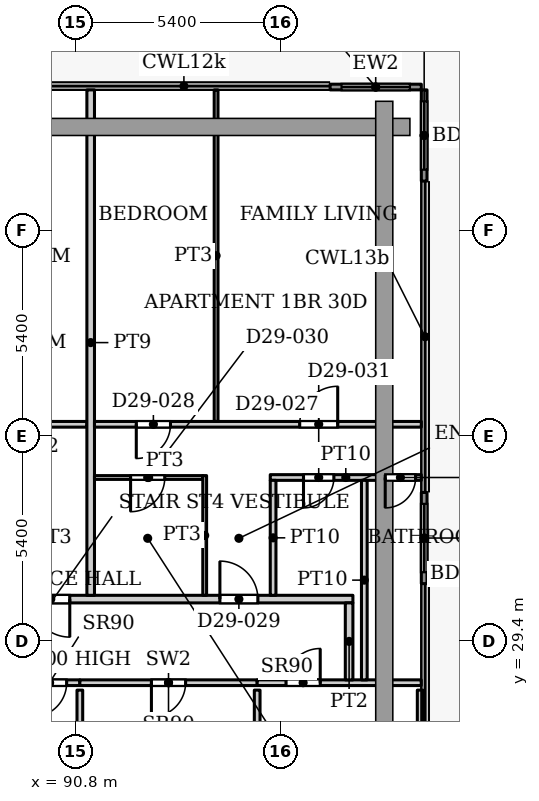
"""IFC4 building model, lengths in metres.
Left out: names, types, materials, properties, quantities, classifications, styles, units other than length and angle.
Written with IfcOpenShell. Run it as: python <this file> out.ifc"""

import sys

from ifc_helpers import new_model, si_unit, direction, frame, frame_2d, origin, place, context, subcontext, project, spatial, rectangle, extrude, source, transform, mapped, element, fill, save


model = new_model("IFC4")
c1 = context("Model", 3, precision=1e-05, world=origin(), true_north=direction((0.0, 1.0)))
c2 = subcontext(c1, "Body", "Model", "MODEL_VIEW")
j1 = project(units=[si_unit("LENGTHUNIT", "METRE"), si_unit("PLANEANGLEUNIT", "RADIAN")], contexts=[c1])
p1 = place(None, origin())
s1 = spatial("IfcSite", under=j1, at=p1, CompositionType="ELEMENT")
p2 = place(p1, origin())
s2 = spatial("IfcBuilding", under=s1, at=p2, CompositionType="ELEMENT")
p3 = place(p2, frame((0.0, 0.0, 129.2)))
s3 = spatial("IfcBuildingStorey", under=s2, at=p3, CompositionType="ELEMENT", Elevation=129.2)
p4 = place(p3, frame((97.5, 43.975, 0.0), z_axis=(0.0, 0.0, 1.0), x_axis=(1.0, 0.0, 0.0)))
e1 = element("IfcWall", 1, at=p4, inside=s3, PredefinedType="SOLIDWALL", context=c2, shape_type="SweptSolid", body=[
    extrude(rectangle(XDim=2.4, YDim=0.15, at=frame_2d((1.2, 0.0))), origin(), (0.0, 0.0, 1.0), 3.75),
])
p5 = place(p4, frame((0.3, 0.0, 0.0)))
e2 = element("IfcOpeningElement", 2, at=p5, cuts=e1, PredefinedType="OPENING", context=c2, shape_type="SweptSolid", body=[
    extrude(rectangle(XDim=1.8, YDim=2.4, at=frame_2d((0.9, 1.2))), frame((0.0, 0.085, 0.0), z_axis=(0.0, -1.0, 0.0), x_axis=(1.0, 0.0, 0.0)), (0.0, 0.0, 1.0), 0.17),
])
p6 = place(p3, frame((99.975, 43.9, 0.0), z_axis=(0.0, 0.0, 1.0), x_axis=(0.0, -1.0, 0.0)))
e3 = element("IfcWall", 3, at=p6, inside=s3, PredefinedType="SOLIDWALL", context=c2, shape_type="SweptSolid", body=[
    extrude(rectangle(XDim=2.4, YDim=0.15, at=frame_2d((1.2, 0.0))), origin(), (0.0, 0.0, 1.0), 3.75),
])
p7 = place(p6, frame((0.3, 0.0, 0.0)))
e4 = element("IfcOpeningElement", 4, at=p7, cuts=e3, PredefinedType="OPENING", context=c2, shape_type="SweptSolid", body=[
    extrude(rectangle(XDim=1.8, YDim=2.4, at=frame_2d((0.9, 1.2))), frame((0.0, 0.085, 0.0), z_axis=(0.0, -1.0, 0.0), x_axis=(1.0, 0.0, 0.0)), (0.0, 0.0, 1.0), 0.17),
])
p8 = place(p3, frame((99.975, 33.307, 0.0), z_axis=(0.0, 0.0, 1.0), x_axis=(0.0, -1.0, 0.0)))
e5 = element("IfcWall", 5, at=p8, inside=s3, PredefinedType="SOLIDWALL", context=c2, shape_type="SweptSolid", body=[
    extrude(rectangle(XDim=2.4, YDim=0.15, at=frame_2d((1.2, 0.0))), origin(), (0.0, 0.0, 1.0), 3.75),
])
p9 = place(p8, frame((0.3, 0.0, 0.0)))
e6 = element("IfcOpeningElement", 6, at=p9, cuts=e5, PredefinedType="OPENING", context=c2, shape_type="SweptSolid", body=[
    extrude(rectangle(XDim=1.8, YDim=2.4, at=frame_2d((0.9, 1.2))), frame((0.0, 0.085, 0.0), z_axis=(0.0, -1.0, 0.0), x_axis=(1.0, 0.0, 0.0)), (0.0, 0.0, 1.0), 0.17),
])
p10 = place(p3, frame((89.32, 28.3, 0.0), z_axis=(0.0, 0.0, 1.0), x_axis=(1.0, 0.0, 0.0)))
e7 = element("IfcWall", 7, at=p10, inside=s3, PredefinedType="PARTITIONING", context=c2, shape_type="SweptSolid", body=[
    extrude(rectangle(XDim=1.595, YDim=0.15, at=frame_2d((0.797, 0.0))), origin(), (0.0, 0.0, 1.0), 2.5),
])
p11 = place(p10, frame((0.348, 0.0, 0.0)))
e8 = element("IfcOpeningElement", 8, at=p11, cuts=e7, PredefinedType="OPENING", context=c2, shape_type="SweptSolid", body=[
    extrude(rectangle(XDim=0.9, YDim=2.2, at=frame_2d((0.45, 1.1))), frame((0.0, 0.085, 0.0), z_axis=(0.0, -1.0, 0.0), x_axis=(1.0, 0.0, 0.0)), (0.0, 0.0, 1.0), 0.17),
])
p12 = place(p3, frame((90.915, 21.487, 0.0), z_axis=(0.0, 0.0, 1.0), x_axis=(0.0, 1.0, 0.0)))
e9 = element("IfcWall", 9, at=p12, inside=s3, PredefinedType="PARTITIONING", context=c2, shape_type="SweptSolid", body=[
    extrude(rectangle(XDim=6.618, YDim=0.15, at=frame_2d((3.309, 0.0))), origin(), (0.0, 0.0, 1.0), 2.5),
])
p13 = place(p3, frame((90.915, 28.3, 0.0), z_axis=(0.0, 0.0, 1.0), x_axis=(1.0, 0.0, 0.0)))
e10 = element("IfcWall", 10, at=p13, inside=s3, PredefinedType="PARTITIONING", context=c2, shape_type="SweptSolid", body=[
    extrude(rectangle(XDim=4.666, YDim=0.15, at=frame_2d((2.333, 0.0))), origin(), (0.0, 0.0, 1.0), 3.9),
])
p14 = place(p13, frame((1.883, 0.0, 0.0)))
e11 = element("IfcOpeningElement", 11, at=p14, cuts=e10, PredefinedType="OPENING", context=c2, shape_type="SweptSolid", body=[
    extrude(rectangle(XDim=0.9, YDim=2.2, at=frame_2d((0.45, 1.1))), frame((0.0, 0.085, 0.0), z_axis=(0.0, -1.0, 0.0), x_axis=(1.0, 0.0, 0.0)), (0.0, 0.0, 1.0), 0.17),
])
p15 = place(p3, frame((95.581, 21.241, 0.0), z_axis=(0.0, 0.0, 1.0), x_axis=(0.0, 1.0, 0.0)))
e12 = element("IfcWall", 12, at=p15, inside=s3, PredefinedType="PARTITIONING", context=c2, shape_type="SweptSolid", body=[
    extrude(rectangle(XDim=6.864, YDim=0.15, at=frame_2d((3.432, 0.0))), origin(), (0.0, 0.0, 1.0), 3.9),
])
p16 = place(p3, frame((95.581, 28.3, 0.0), z_axis=(0.0, 0.0, 1.0), x_axis=(1.0, 0.0, 0.0)))
e13 = element("IfcWall", 13, at=p16, inside=s3, PredefinedType="PARTITIONING", context=c2, shape_type="SweptSolid", body=[
    extrude(rectangle(XDim=4.317, YDim=0.15, at=frame_2d((2.158, 0.0))), origin(), (0.0, 0.0, 1.0), 3.9),
])
p17 = place(p16, frame((0.759, 0.0, 0.0)))
e14 = element("IfcOpeningElement", 14, at=p17, cuts=e13, PredefinedType="OPENING", context=c2, shape_type="SweptSolid", body=[
    extrude(rectangle(XDim=0.9, YDim=2.2, at=frame_2d((0.45, 1.1))), frame((0.0, 0.085, 0.0), z_axis=(0.0, -1.0, 0.0), x_axis=(1.0, 0.0, 0.0)), (0.0, 0.0, 1.0), 0.17),
])
p18 = place(p3, frame((99.87, 21.015, 0.0), z_axis=(0.0, 0.0, 1.0), x_axis=(0.0, 1.0, 0.0)))
e15 = element("IfcWall", 15, at=p18, inside=s3, PredefinedType="PARTITIONING", context=c2, shape_type="SweptSolid", body=[
    extrude(rectangle(XDim=7.09, YDim=0.15, at=frame_2d((3.545, 0.0))), origin(), (0.0, 0.0, 1.0), 3.9),
])
p19 = place(p3, frame((55.9, 30.5, 0.0), z_axis=(0.0, 0.0, 1.0), x_axis=(1.0, 0.0, 0.0)))
e16 = element("IfcWall", 16, at=p19, inside=s3, PredefinedType="PARTITIONING", context=c2, shape_type="SweptSolid", body=[
    extrude(rectangle(XDim=42.2, YDim=0.2, at=frame_2d((21.1, 0.0))), origin(), (0.0, 0.0, 1.0), 3.6),
])
p20 = place(p19, frame((0.45, 0.0, 0.0)))
e17 = element("IfcOpeningElement", 17, at=p20, cuts=e16, PredefinedType="OPENING", context=c2, shape_type="SweptSolid", body=[
    extrude(rectangle(XDim=1.0, YDim=2.1, at=frame_2d((0.5, 1.05))), frame((0.0, 0.11, 0.0), z_axis=(0.0, -1.0, 0.0), x_axis=(1.0, 0.0, 0.0)), (0.0, 0.0, 1.0), 0.22),
])
p21 = place(p19, frame((20.1, 0.0, 0.0)))
e18 = element("IfcOpeningElement", 18, at=p21, cuts=e16, PredefinedType="OPENING", context=c2, shape_type="SweptSolid", body=[
    extrude(rectangle(XDim=1.0, YDim=2.1, at=frame_2d((0.5, 1.05))), frame((0.0, 0.11, 0.0), z_axis=(0.0, -1.0, 0.0), x_axis=(1.0, 0.0, 0.0)), (0.0, 0.0, 1.0), 0.22),
])
p22 = place(p19, frame((33.75, 0.0, 0.0)))
e19 = element("IfcOpeningElement", 19, at=p22, cuts=e16, PredefinedType="OPENING", context=c2, shape_type="SweptSolid", body=[
    extrude(rectangle(XDim=1.0, YDim=2.1, at=frame_2d((0.5, 1.05))), frame((0.0, 0.11, 0.0), z_axis=(0.0, -1.0, 0.0), x_axis=(1.0, 0.0, 0.0)), (0.0, 0.0, 1.0), 0.22),
])
p23 = place(p19, frame((38.7, 0.0, 0.0)))
e20 = element("IfcOpeningElement", 20, at=p23, cuts=e16, PredefinedType="OPENING", context=c2, shape_type="SweptSolid", body=[
    extrude(rectangle(XDim=1.0, YDim=2.1, at=frame_2d((0.5, 1.05))), frame((0.0, 0.11, 0.0), z_axis=(0.0, -1.0, 0.0), x_axis=(1.0, 0.0, 0.0)), (0.0, 0.0, 1.0), 0.22),
])
p24 = place(p3, frame((81.7, 35.1, 0.0), z_axis=(0.0, 0.0, 1.0), x_axis=(1.0, 0.0, 0.0)))
e21 = element("IfcWall", 21, at=p24, inside=s3, PredefinedType="PARTITIONING", context=c2, shape_type="SweptSolid", body=[
    extrude(rectangle(XDim=9.4, YDim=0.15, at=frame_2d((4.7, 0.0))), origin(), (0.0, 0.0, 1.0), 3.6),
])
p25 = place(p24, frame((7.1, 0.0, 0.0)))
e22 = element("IfcOpeningElement", 22, at=p25, cuts=e21, PredefinedType="OPENING", context=c2, shape_type="SweptSolid", body=[
    extrude(rectangle(XDim=0.9, YDim=2.1, at=frame_2d((0.45, 1.05))), frame((0.0, 0.085, 0.0), z_axis=(0.0, -1.0, 0.0), x_axis=(1.0, 0.0, 0.0)), (0.0, 0.0, 1.0), 0.17),
])
p26 = place(p24, frame((2.25, 0.0, 0.0)))
e23 = element("IfcOpeningElement", 23, at=p26, cuts=e21, PredefinedType="OPENING", context=c2, shape_type="SweptSolid", body=[
    extrude(rectangle(XDim=1.0, YDim=2.1, at=frame_2d((0.5, 1.05))), frame((0.0, 0.085, 0.0), z_axis=(0.0, -1.0, 0.0), x_axis=(1.0, 0.0, 0.0)), (0.0, 0.0, 1.0), 0.17),
])
p27 = place(p3, frame((91.2, 30.6, 0.0), z_axis=(0.0, 0.0, 1.0), x_axis=(0.0, 1.0, 0.0)))
e24 = element("IfcWall", 24, at=p27, inside=s3, PredefinedType="PARTITIONING", context=c2, shape_type="SweptSolid", body=[
    extrude(rectangle(XDim=13.3, YDim=0.2, at=frame_2d((6.65, 0.0))), origin(), (0.0, 0.0, 1.0), 3.6),
])
p28 = place(p3, frame((91.3, 33.7, 0.0), z_axis=(0.0, 0.0, 1.0), x_axis=(1.0, 0.0, 0.0)))
e25 = element("IfcWall", 25, at=p28, inside=s3, PredefinedType="PARTITIONING", context=c2, shape_type="SweptSolid", body=[
    extrude(rectangle(XDim=2.85, YDim=0.1, at=frame_2d((1.425, 0.0))), origin(), (0.0, 0.0, 1.0), 3.6),
])
p29 = place(p28, frame((0.95, 0.0, 0.0)))
e26 = element("IfcOpeningElement", 26, at=p29, cuts=e25, PredefinedType="OPENING", context=c2, shape_type="SweptSolid", body=[
    extrude(rectangle(XDim=0.9, YDim=2.1, at=frame_2d((0.45, 1.05))), frame((0.0, 0.06, 0.0), z_axis=(0.0, -1.0, 0.0), x_axis=(1.0, 0.0, 0.0)), (0.0, 0.0, 1.0), 0.12),
])
p30 = place(p3, frame((91.3, 35.1, 0.0), z_axis=(0.0, 0.0, 1.0), x_axis=(1.0, 0.0, 0.0)))
e27 = element("IfcWall", 27, at=p30, inside=s3, PredefinedType="PARTITIONING", context=c2, shape_type="SweptSolid", body=[
    extrude(rectangle(XDim=8.6, YDim=0.15, at=frame_2d((4.3, 0.0))), origin(), (0.0, 0.0, 1.0), 3.6),
])
p31 = place(p30, frame((1.1, 0.0, 0.0)))
e28 = element("IfcOpeningElement", 28, at=p31, cuts=e27, PredefinedType="OPENING", context=c2, shape_type="SweptSolid", body=[
    extrude(rectangle(XDim=0.9, YDim=2.1, at=frame_2d((0.45, 1.05))), frame((0.0, 0.085, 0.0), z_axis=(0.0, -1.0, 0.0), x_axis=(1.0, 0.0, 0.0)), (0.0, 0.0, 1.0), 0.17),
])
p32 = place(p30, frame((5.4, 0.0, 0.0)))
e29 = element("IfcOpeningElement", 29, at=p32, cuts=e27, PredefinedType="OPENING", context=c2, shape_type="SweptSolid", body=[
    extrude(rectangle(XDim=1.0, YDim=2.1, at=frame_2d((0.5, 1.05))), frame((0.0, 0.085, 0.0), z_axis=(0.0, -1.0, 0.0), x_axis=(1.0, 0.0, 0.0)), (0.0, 0.0, 1.0), 0.17),
])
p33 = place(p3, frame((94.2, 30.6, 0.0), z_axis=(0.0, 0.0, 1.0), x_axis=(0.0, 1.0, 0.0)))
e30 = element("IfcWall", 30, at=p33, inside=s3, PredefinedType="PARTITIONING", context=c2, shape_type="SweptSolid", body=[
    extrude(rectangle(XDim=3.15, YDim=0.1, at=frame_2d((1.575, 0.0))), origin(), (0.0, 0.0, 1.0), 3.6),
])
p34 = place(p3, frame((94.5, 35.175, 0.0), z_axis=(0.0, 0.0, 1.0), x_axis=(0.0, 1.0, 0.0)))
e31 = element("IfcWall", 31, at=p34, inside=s3, PredefinedType="PARTITIONING", context=c2, shape_type="SweptSolid", body=[
    extrude(rectangle(XDim=8.725, YDim=0.1, at=frame_2d((4.362, 0.0))), origin(), (0.0, 0.0, 1.0), 3.6),
])
p35 = place(p3, frame((95.925, 33.7, 0.0), z_axis=(0.0, 0.0, 1.0), x_axis=(1.0, 0.0, 0.0)))
e32 = element("IfcWall", 32, at=p35, inside=s3, PredefinedType="PARTITIONING", context=c2, shape_type="SweptSolid", body=[
    extrude(rectangle(XDim=3.975, YDim=0.15, at=frame_2d((1.987, 0.0))), origin(), (0.0, 0.0, 1.0), 3.6),
])
p36 = place(p35, frame((0.875, 0.0, 0.0)))
e33 = element("IfcOpeningElement", 33, at=p36, cuts=e32, PredefinedType="OPENING", context=c2, shape_type="SweptSolid", body=[
    extrude(rectangle(XDim=0.8, YDim=2.1, at=frame_2d((0.4, 1.05))), frame((0.0, 0.085, 0.0), z_axis=(0.0, -1.0, 0.0), x_axis=(1.0, 0.0, 0.0)), (0.0, 0.0, 1.0), 0.17),
])
p37 = place(p35, frame((3.025, 0.0, 0.0)))
e34 = element("IfcOpeningElement", 34, at=p37, cuts=e32, PredefinedType="OPENING", context=c2, shape_type="SweptSolid", body=[
    extrude(rectangle(XDim=0.8, YDim=2.1, at=frame_2d((0.4, 1.05))), frame((0.0, 0.085, 0.0), z_axis=(0.0, -1.0, 0.0), x_axis=(1.0, 0.0, 0.0)), (0.0, 0.0, 1.0), 0.17),
])
p38 = place(p3, frame((96.0, 30.6, 0.0), z_axis=(0.0, 0.0, 1.0), x_axis=(0.0, 1.0, 0.0)))
e35 = element("IfcWall", 35, at=p38, inside=s3, PredefinedType="PARTITIONING", context=c2, shape_type="SweptSolid", body=[
    extrude(rectangle(XDim=3.025, YDim=0.15, at=frame_2d((1.512, 0.0))), origin(), (0.0, 0.0, 1.0), 3.6),
])
p39 = place(p3, frame((98.0, 28.374, 0.0), z_axis=(0.0, 0.0, 1.0), x_axis=(0.0, 1.0, 0.0)))
e36 = element("IfcWall", 36, at=p39, inside=s3, PredefinedType="PARTITIONING", context=c2, shape_type="SweptSolid", body=[
    extrude(rectangle(XDim=2.026, YDim=0.2, at=frame_2d((1.013, 0.0))), origin(), (0.0, 0.0, 1.0), 3.6),
])
p40 = place(p3, frame((98.4, 28.374, 0.0), z_axis=(0.0, 0.0, 1.0), x_axis=(0.0, 1.0, 0.0)))
e37 = element("IfcWall", 37, at=p40, inside=s3, PredefinedType="PARTITIONING", context=c2, shape_type="SweptSolid", body=[
    extrude(rectangle(XDim=5.251, YDim=0.15, at=frame_2d((2.625, 0.0))), origin(), (0.0, 0.0, 1.0), 3.6),
])
m1 = source(origin(), c2, "Body", "SweptSolid", [
    extrude(rectangle(XDim=1.8, YDim=2.4, at=frame_2d((0.9, 1.2))), frame((0.0, 0.025, 0.0), z_axis=(0.0, -1.0, 0.0), x_axis=(1.0, 0.0, 0.0)), (0.0, 0.0, 1.0), 0.05),
])
p41 = place(p5, origin())
e38 = element("IfcDoor", 38, at=p41, inside=s3, OperationType="SLIDING_TO_LEFT", PredefinedType="DOOR", context=c2, shape_type="MappedRepresentation", body=[
    mapped(m1, transform((0.0, 0.0, 0.0), x_axis=(1.0, 0.0, 0.0), y_axis=(0.0, 1.0, 0.0), z_axis=(0.0, 0.0, 1.0), scale=1.0)),
])
fill(e2, e38)
p42 = place(p7, origin())
e39 = element("IfcDoor", 39, at=p42, inside=s3, OperationType="SLIDING_TO_LEFT", PredefinedType="DOOR", context=c2, shape_type="MappedRepresentation", body=[
    mapped(m1, transform((0.0, 0.0, 0.0), x_axis=(1.0, 0.0, 0.0), y_axis=(0.0, 1.0, 0.0), z_axis=(0.0, 0.0, 1.0), scale=1.0)),
])
fill(e4, e39)
p43 = place(p9, origin())
e40 = element("IfcDoor", 40, at=p43, inside=s3, OperationType="SLIDING_TO_LEFT", PredefinedType="DOOR", context=c2, shape_type="MappedRepresentation", body=[
    mapped(m1, transform((0.0, 0.0, 0.0), x_axis=(1.0, 0.0, 0.0), y_axis=(0.0, 1.0, 0.0), z_axis=(0.0, 0.0, 1.0), scale=1.0)),
])
fill(e6, e40)
m2 = source(origin(), c2, "Body", "SweptSolid", [
    extrude(rectangle(XDim=0.9, YDim=2.2, at=frame_2d((0.45, 1.1))), frame((0.0, 0.025, 0.0), z_axis=(0.0, -1.0, 0.0), x_axis=(1.0, 0.0, 0.0)), (0.0, 0.0, 1.0), 0.05),
])
p44 = place(p11, origin())
e41 = element("IfcDoor", 41, at=p44, inside=s3, OperationType="SINGLE_SWING_RIGHT", PredefinedType="DOOR", context=c2, shape_type="MappedRepresentation", body=[
    mapped(m2, transform((0.0, 0.0, 0.0), x_axis=(1.0, 0.0, 0.0), y_axis=(0.0, 1.0, 0.0), z_axis=(0.0, 0.0, 1.0), scale=1.0)),
])
fill(e8, e41)
p45 = place(p14, origin())
e42 = element("IfcDoor", 42, at=p45, inside=s3, OperationType="SINGLE_SWING_RIGHT", PredefinedType="DOOR", context=c2, shape_type="MappedRepresentation", body=[
    mapped(m2, transform((0.0, 0.0, 0.0), x_axis=(1.0, 0.0, 0.0), y_axis=(0.0, 1.0, 0.0), z_axis=(0.0, 0.0, 1.0), scale=1.0)),
])
fill(e11, e42)
p46 = place(p17, origin())
e43 = element("IfcDoor", 43, at=p46, inside=s3, OperationType="SINGLE_SWING_LEFT", PredefinedType="DOOR", context=c2, shape_type="MappedRepresentation", body=[
    mapped(m2, transform((0.0, 0.0, 0.0), x_axis=(1.0, 0.0, 0.0), y_axis=(0.0, 1.0, 0.0), z_axis=(0.0, 0.0, 1.0), scale=1.0)),
])
fill(e14, e43)
m3 = source(origin(), c2, "Body", "SweptSolid", [
    extrude(rectangle(XDim=1.0, YDim=2.1, at=frame_2d((0.5, 1.05))), frame((0.0, 0.025, 0.0), z_axis=(0.0, -1.0, 0.0), x_axis=(1.0, 0.0, 0.0)), (0.0, 0.0, 1.0), 0.05),
])
p47 = place(p22, origin())
e44 = element("IfcDoor", 44, at=p47, inside=s3, OperationType="SINGLE_SWING_RIGHT", PredefinedType="DOOR", context=c2, shape_type="MappedRepresentation", body=[
    mapped(m3, transform((0.0, 0.0, 0.0), x_axis=(1.0, 0.0, 0.0), y_axis=(0.0, 1.0, 0.0), z_axis=(0.0, 0.0, 1.0), scale=1.0)),
])
fill(e19, e44)
m4 = source(origin(), c2, "Body", "SweptSolid", [
    extrude(rectangle(XDim=0.8, YDim=2.1, at=frame_2d((0.4, 1.05))), frame((0.0, 0.025, 0.0), z_axis=(0.0, -1.0, 0.0), x_axis=(1.0, 0.0, 0.0)), (0.0, 0.0, 1.0), 0.05),
])
p48 = place(p36, origin())
e45 = element("IfcDoor", 45, at=p48, inside=s3, OperationType="SINGLE_SWING_RIGHT", PredefinedType="DOOR", context=c2, shape_type="MappedRepresentation", body=[
    mapped(m4, transform((0.0, 0.0, 0.0), x_axis=(1.0, 0.0, 0.0), y_axis=(0.0, 1.0, 0.0), z_axis=(0.0, 0.0, 1.0), scale=1.0)),
])
fill(e33, e45)
m5 = source(origin(), c2, "Body", "SweptSolid", [
    extrude(rectangle(XDim=0.9, YDim=2.1, at=frame_2d((0.45, 1.05))), frame((0.0, 0.025, 0.0), z_axis=(0.0, -1.0, 0.0), x_axis=(1.0, 0.0, 0.0)), (0.0, 0.0, 1.0), 0.05),
])
p49 = place(p31, origin())
e46 = element("IfcDoor", 46, at=p49, inside=s3, OperationType="SINGLE_SWING_RIGHT", PredefinedType="DOOR", context=c2, shape_type="MappedRepresentation", body=[
    mapped(m5, transform((0.0, 0.0, 0.0), x_axis=(1.0, 0.0, 0.0), y_axis=(0.0, 1.0, 0.0), z_axis=(0.0, 0.0, 1.0), scale=1.0)),
])
fill(e28, e46)
p50 = place(p23, origin())
e47 = element("IfcDoor", 47, at=p50, inside=s3, OperationType="SINGLE_SWING_LEFT", PredefinedType="DOOR", context=c2, shape_type="MappedRepresentation", body=[
    mapped(m3, transform((0.0, 0.0, 0.0), x_axis=(1.0, 0.0, 0.0), y_axis=(0.0, 1.0, 0.0), z_axis=(0.0, 0.0, 1.0), scale=1.0)),
])
fill(e20, e47)
p51 = place(p29, origin())
e48 = element("IfcDoor", 48, at=p51, inside=s3, OperationType="SINGLE_SWING_RIGHT", PredefinedType="DOOR", context=c2, shape_type="MappedRepresentation", body=[
    mapped(m5, transform((0.0, 0.0, 0.0), x_axis=(1.0, 0.0, 0.0), y_axis=(0.0, 1.0, 0.0), z_axis=(0.0, 0.0, 1.0), scale=1.0)),
])
fill(e26, e48)
m6 = source(origin(), c2, "Body", "SweptSolid", [
    extrude(rectangle(XDim=1.0, YDim=2.1, at=frame_2d((0.5, 1.05))), frame((0.0, 0.025, 0.0), z_axis=(0.0, -1.0, 0.0), x_axis=(1.0, 0.0, 0.0)), (0.0, 0.0, 1.0), 0.05),
])
p52 = place(p32, origin())
e49 = element("IfcDoor", 49, at=p52, inside=s3, OperationType="SINGLE_SWING_LEFT", PredefinedType="DOOR", context=c2, shape_type="MappedRepresentation", body=[
    mapped(m6, transform((0.0, 0.0, 0.0), x_axis=(1.0, 0.0, 0.0), y_axis=(0.0, 1.0, 0.0), z_axis=(0.0, 0.0, 1.0), scale=1.0)),
])
fill(e29, e49)
p53 = place(p37, origin())
e50 = element("IfcDoor", 50, at=p53, inside=s3, OperationType="SINGLE_SWING_RIGHT", PredefinedType="DOOR", context=c2, shape_type="MappedRepresentation", body=[
    mapped(m4, transform((0.0, 0.0, 0.0), x_axis=(1.0, 0.0, 0.0), y_axis=(0.0, 1.0, 0.0), z_axis=(0.0, 0.0, 1.0), scale=1.0)),
])
fill(e34, e50)
save(model, sys.argv[1])
